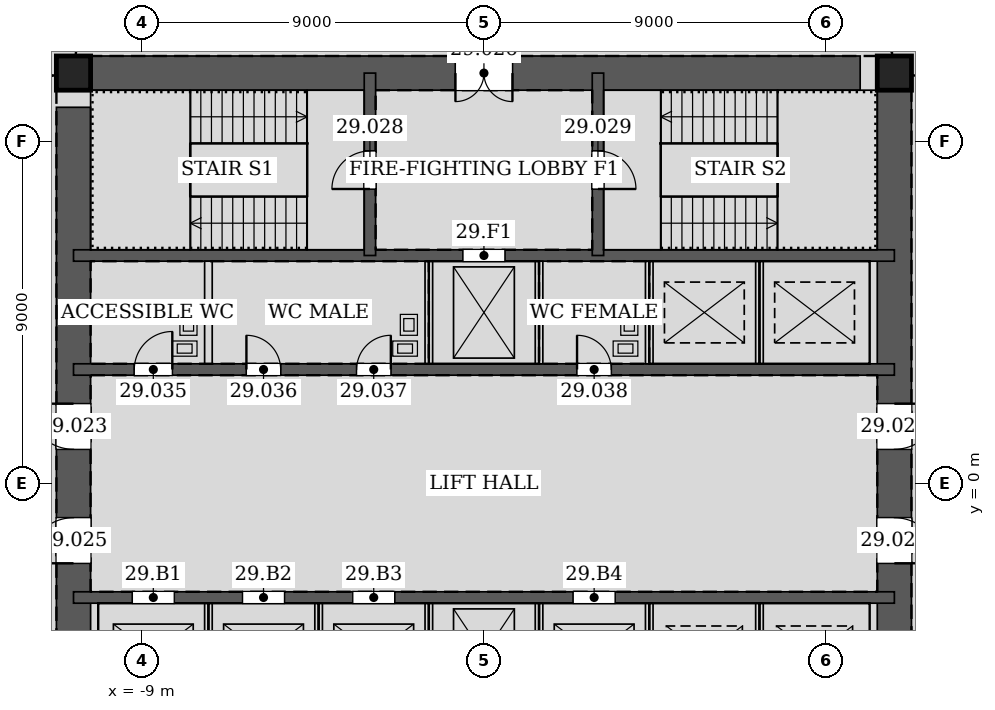
"""IFC4 building model, lengths in metres.
Left out: names, types, materials, properties, quantities, classifications, styles, units other than length and angle.
Written with IfcOpenShell. Run it as: python <this file> out.ifc"""

import sys

from ifc_helpers import new_model, si_unit, direction, frame, frame_2d, origin, origin_2d, place, context, subcontext, project, spatial, rectangle, hollow_rectangle, extrude, element, fill, save


model = new_model("IFC4")
c1 = context("Model", 3, precision=1e-05, world=origin(), true_north=direction((0.0, 1.0)))
c2 = subcontext(c1, "Body", "Model", "MODEL_VIEW")
j1 = project(units=[si_unit("LENGTHUNIT", "METRE"), si_unit("PLANEANGLEUNIT", "RADIAN")], contexts=[c1])
p1 = place(None, origin())
s1 = spatial("IfcSite", under=j1, at=p1, CompositionType="ELEMENT")
p2 = place(p1, origin())
s2 = spatial("IfcBuilding", under=s1, at=p2, CompositionType="ELEMENT")
p3 = place(p2, frame((0.0, 0.0, 130.2)))
s3 = spatial("IfcBuildingStorey", under=s2, at=p3, CompositionType="ELEMENT", Elevation=130.2)
for number, where, z_axis, x_axis in (
    (1, (10.8, 10.8, 0.0), (0.0, 0.0, 1.0), (1.0, 0.0, 0.0)),
    (2, (-10.8, 10.8, 0.0), (0.0, 0.0, 1.0), (1.0, 0.0, 0.0)),
):
    element("IfcColumn", number, at=place(p3, frame(where, z_axis=z_axis, x_axis=x_axis)), inside=s3, PredefinedType="COLUMN", context=c2, shape_type="SweptSolid", body=[
        extrude(hollow_rectangle(XDim=0.9, YDim=0.9, WallThickness=0.06, at=origin_2d()), origin(), (0.0, 0.0, 1.0), 4.2),
    ])
p4 = place(p3, frame((10.8, -10.8, 0.0), z_axis=(0.0, 0.0, 1.0), x_axis=(0.0, 1.0, 0.0)))
e3 = element("IfcWall", 3, at=p4, inside=s3, PredefinedType="SOLIDWALL", context=c2, shape_type="SweptSolid", body=[
    extrude(rectangle(XDim=21.6, YDim=0.9, at=frame_2d((10.8, 0.0))), origin(), (0.0, 0.0, 1.0), 4.2),
])
p5 = place(p4, frame((11.7, 0.0, 0.0)))
e4 = element("IfcOpeningElement", 4, at=p5, cuts=e3, PredefinedType="OPENING", context=c2, shape_type="SweptSolid", body=[
    extrude(rectangle(XDim=1.2, YDim=2.1, at=frame_2d((0.6, 1.05))), frame((0.0, 0.46, 0.0), z_axis=(0.0, -1.0, 0.0), x_axis=(1.0, 0.0, 0.0)), (0.0, 0.0, 1.0), 0.92),
])
p6 = place(p4, frame((8.7, 0.0, 0.0)))
e5 = element("IfcOpeningElement", 5, at=p6, cuts=e3, PredefinedType="OPENING", context=c2, shape_type="SweptSolid", body=[
    extrude(rectangle(XDim=1.2, YDim=2.1, at=frame_2d((0.6, 1.05))), frame((0.0, 0.46, 0.0), z_axis=(0.0, -1.0, 0.0), x_axis=(1.0, 0.0, 0.0)), (0.0, 0.0, 1.0), 0.92),
])
p7 = place(p3, frame((10.8, 10.8, 0.0), z_axis=(0.0, 0.0, 1.0), x_axis=(-1.0, 0.0, 0.0)))
e6 = element("IfcWall", 6, at=p7, inside=s3, PredefinedType="SOLIDWALL", context=c2, shape_type="SweptSolid", body=[
    extrude(rectangle(XDim=21.6, YDim=0.9, at=frame_2d((10.8, 0.0))), origin(), (0.0, 0.0, 1.0), 4.2),
])
p8 = place(p7, frame((10.05, 0.0, 0.0)))
e7 = element("IfcOpeningElement", 7, at=p8, cuts=e6, PredefinedType="OPENING", context=c2, shape_type="SweptSolid", body=[
    extrude(rectangle(XDim=1.5, YDim=2.1, at=frame_2d((0.75, 1.05))), frame((0.0, 0.46, 0.0), z_axis=(0.0, -1.0, 0.0), x_axis=(1.0, 0.0, 0.0)), (0.0, 0.0, 1.0), 0.92),
])
p9 = place(p3, frame((-10.8, 10.8, 0.0), z_axis=(0.0, 0.0, 1.0), x_axis=(0.0, -1.0, 0.0)))
e8 = element("IfcWall", 8, at=p9, inside=s3, PredefinedType="SOLIDWALL", context=c2, shape_type="SweptSolid", body=[
    extrude(rectangle(XDim=21.6, YDim=0.9, at=frame_2d((10.8, 0.0))), origin(), (0.0, 0.0, 1.0), 4.2),
])
p10 = place(p9, frame((8.7, 0.0, 0.0)))
e9 = element("IfcOpeningElement", 9, at=p10, cuts=e8, PredefinedType="OPENING", context=c2, shape_type="SweptSolid", body=[
    extrude(rectangle(XDim=1.2, YDim=2.1, at=frame_2d((0.6, 1.05))), frame((0.0, 0.46, 0.0), z_axis=(0.0, -1.0, 0.0), x_axis=(1.0, 0.0, 0.0)), (0.0, 0.0, 1.0), 0.92),
])
p11 = place(p9, frame((11.7, 0.0, 0.0)))
e10 = element("IfcOpeningElement", 10, at=p11, cuts=e8, PredefinedType="OPENING", context=c2, shape_type="SweptSolid", body=[
    extrude(rectangle(XDim=1.2, YDim=2.1, at=frame_2d((0.6, 1.05))), frame((0.0, 0.46, 0.0), z_axis=(0.0, -1.0, 0.0), x_axis=(1.0, 0.0, 0.0)), (0.0, 0.0, 1.0), 0.92),
])
p12 = place(p3, frame((-10.8, 3.0, 0.0), z_axis=(0.0, 0.0, 1.0), x_axis=(1.0, 0.0, 0.0)))
e11 = element("IfcWall", 11, at=p12, inside=s3, PredefinedType="SOLIDWALL", context=c2, shape_type="SweptSolid", body=[
    extrude(rectangle(XDim=21.6, YDim=0.3, at=frame_2d((10.8, 0.0))), origin(), (0.0, 0.0, 1.0), 4.2),
])
p13 = place(p12, frame((1.6, 0.0, 0.0)))
e12 = element("IfcOpeningElement", 12, at=p13, cuts=e11, PredefinedType="OPENING", context=c2, shape_type="SweptSolid", body=[
    extrude(rectangle(XDim=1.0, YDim=2.1, at=frame_2d((0.5, 1.05))), frame((0.0, 0.16, 0.0), z_axis=(0.0, -1.0, 0.0), x_axis=(1.0, 0.0, 0.0)), (0.0, 0.0, 1.0), 0.32),
])
p14 = place(p12, frame((4.55, 0.0, 0.0)))
e13 = element("IfcOpeningElement", 13, at=p14, cuts=e11, PredefinedType="OPENING", context=c2, shape_type="SweptSolid", body=[
    extrude(rectangle(XDim=0.9, YDim=2.1, at=frame_2d((0.45, 1.05))), frame((0.0, 0.16, 0.0), z_axis=(0.0, -1.0, 0.0), x_axis=(1.0, 0.0, 0.0)), (0.0, 0.0, 1.0), 0.32),
])
p15 = place(p12, frame((7.45, 0.0, 0.0)))
e14 = element("IfcOpeningElement", 14, at=p15, cuts=e11, PredefinedType="OPENING", context=c2, shape_type="SweptSolid", body=[
    extrude(rectangle(XDim=0.9, YDim=2.1, at=frame_2d((0.45, 1.05))), frame((0.0, 0.16, 0.0), z_axis=(0.0, -1.0, 0.0), x_axis=(1.0, 0.0, 0.0)), (0.0, 0.0, 1.0), 0.32),
])
p16 = place(p12, frame((13.25, 0.0, 0.0)))
e15 = element("IfcOpeningElement", 15, at=p16, cuts=e11, PredefinedType="OPENING", context=c2, shape_type="SweptSolid", body=[
    extrude(rectangle(XDim=0.9, YDim=2.1, at=frame_2d((0.45, 1.05))), frame((0.0, 0.16, 0.0), z_axis=(0.0, -1.0, 0.0), x_axis=(1.0, 0.0, 0.0)), (0.0, 0.0, 1.0), 0.32),
])
p17 = place(p3, frame((-10.8, 6.0, 0.0), z_axis=(0.0, 0.0, 1.0), x_axis=(1.0, 0.0, 0.0)))
e16 = element("IfcWall", 16, at=p17, inside=s3, PredefinedType="SOLIDWALL", context=c2, shape_type="SweptSolid", body=[
    extrude(rectangle(XDim=21.6, YDim=0.3, at=frame_2d((10.8, 0.0))), origin(), (0.0, 0.0, 1.0), 4.2),
])
p18 = place(p17, frame((10.25, 0.0, 0.0)))
e17 = element("IfcOpeningElement", 17, at=p18, cuts=e16, PredefinedType="OPENING", context=c2, shape_type="SweptSolid", body=[
    extrude(rectangle(XDim=1.1, YDim=2.1, at=frame_2d((0.55, 1.05))), frame((0.0, 0.16, 0.0), z_axis=(0.0, -1.0, 0.0), x_axis=(1.0, 0.0, 0.0)), (0.0, 0.0, 1.0), 0.32),
])
p19 = place(p3, frame((-3.0, 6.0, 0.0), z_axis=(0.0, 0.0, 1.0), x_axis=(0.0, 1.0, 0.0)))
e18 = element("IfcWall", 18, at=p19, inside=s3, PredefinedType="SOLIDWALL", context=c2, shape_type="SweptSolid", body=[
    extrude(rectangle(XDim=4.8, YDim=0.3, at=frame_2d((2.4, 0.0))), origin(), (0.0, 0.0, 1.0), 4.2),
])
p20 = place(p19, frame((1.75, 0.0, 0.0)))
e19 = element("IfcOpeningElement", 19, at=p20, cuts=e18, PredefinedType="OPENING", context=c2, shape_type="SweptSolid", body=[
    extrude(rectangle(XDim=1.0, YDim=2.1, at=frame_2d((0.5, 1.05))), frame((0.0, 0.16, 0.0), z_axis=(0.0, -1.0, 0.0), x_axis=(1.0, 0.0, 0.0)), (0.0, 0.0, 1.0), 0.32),
])
p21 = place(p3, frame((3.0, 6.0, 0.0), z_axis=(0.0, 0.0, 1.0), x_axis=(0.0, 1.0, 0.0)))
e20 = element("IfcWall", 20, at=p21, inside=s3, PredefinedType="SOLIDWALL", context=c2, shape_type="SweptSolid", body=[
    extrude(rectangle(XDim=4.8, YDim=0.3, at=frame_2d((2.4, 0.0))), origin(), (0.0, 0.0, 1.0), 4.2),
])
p22 = place(p21, frame((1.75, 0.0, 0.0)))
e21 = element("IfcOpeningElement", 21, at=p22, cuts=e20, PredefinedType="OPENING", context=c2, shape_type="SweptSolid", body=[
    extrude(rectangle(XDim=1.0, YDim=2.1, at=frame_2d((0.5, 1.05))), frame((0.0, 0.16, 0.0), z_axis=(0.0, -1.0, 0.0), x_axis=(1.0, 0.0, 0.0)), (0.0, 0.0, 1.0), 0.32),
])
p23 = place(p3, frame((-10.8, -3.0, 0.0), z_axis=(0.0, 0.0, 1.0), x_axis=(1.0, 0.0, 0.0)))
e22 = element("IfcWall", 22, at=p23, inside=s3, PredefinedType="SOLIDWALL", context=c2, shape_type="SweptSolid", body=[
    extrude(rectangle(XDim=21.6, YDim=0.3, at=frame_2d((10.8, 0.0))), origin(), (0.0, 0.0, 1.0), 4.2),
])
p24 = place(p23, frame((1.55, 0.0, 0.0)))
e23 = element("IfcOpeningElement", 23, at=p24, cuts=e22, PredefinedType="OPENING", context=c2, shape_type="SweptSolid", body=[
    extrude(rectangle(XDim=1.1, YDim=2.1, at=frame_2d((0.55, 1.05))), frame((0.0, 0.16, 0.0), z_axis=(0.0, -1.0, 0.0), x_axis=(1.0, 0.0, 0.0)), (0.0, 0.0, 1.0), 0.32),
])
p25 = place(p23, frame((4.45, 0.0, 0.0)))
e24 = element("IfcOpeningElement", 24, at=p25, cuts=e22, PredefinedType="OPENING", context=c2, shape_type="SweptSolid", body=[
    extrude(rectangle(XDim=1.1, YDim=2.1, at=frame_2d((0.55, 1.05))), frame((0.0, 0.16, 0.0), z_axis=(0.0, -1.0, 0.0), x_axis=(1.0, 0.0, 0.0)), (0.0, 0.0, 1.0), 0.32),
])
p26 = place(p23, frame((7.35, 0.0, 0.0)))
e25 = element("IfcOpeningElement", 25, at=p26, cuts=e22, PredefinedType="OPENING", context=c2, shape_type="SweptSolid", body=[
    extrude(rectangle(XDim=1.1, YDim=2.1, at=frame_2d((0.55, 1.05))), frame((0.0, 0.16, 0.0), z_axis=(0.0, -1.0, 0.0), x_axis=(1.0, 0.0, 0.0)), (0.0, 0.0, 1.0), 0.32),
])
p27 = place(p23, frame((13.15, 0.0, 0.0)))
e26 = element("IfcOpeningElement", 26, at=p27, cuts=e22, PredefinedType="OPENING", context=c2, shape_type="SweptSolid", body=[
    extrude(rectangle(XDim=1.1, YDim=2.1, at=frame_2d((0.55, 1.05))), frame((0.0, 0.16, 0.0), z_axis=(0.0, -1.0, 0.0), x_axis=(1.0, 0.0, 0.0)), (0.0, 0.0, 1.0), 0.32),
])
for number, where, z_axis, x_axis in (
    (27, (-7.25, 3.15, 0.0), (0.0, 0.0, 1.0), (0.0, 1.0, 0.0)),
    (28, (-1.45, 3.15, 0.0), (0.0, 0.0, 1.0), (0.0, 1.0, 0.0)),
    (29, (1.45, 3.15, 0.0), (0.0, 0.0, 1.0), (0.0, 1.0, 0.0)),
    (30, (4.35, 3.15, 0.0), (0.0, 0.0, 1.0), (0.0, 1.0, 0.0)),
):
    element("IfcWall", number, at=place(p3, frame(where, z_axis=z_axis, x_axis=x_axis)), inside=s3, PredefinedType="PARTITIONING", context=c2, shape_type="SweptSolid", body=[
        extrude(rectangle(XDim=2.7, YDim=0.2, at=frame_2d((1.35, 0.0))), origin(), (0.0, 0.0, 1.0), 4.035),
    ])
for number, where, z_axis, x_axis in (
    (31, (7.25, 3.15, 0.0), (0.0, 0.0, 1.0), (0.0, 1.0, 0.0)),
    (32, (-7.25, -5.85, 0.0), (0.0, 0.0, 1.0), (0.0, 1.0, 0.0)),
    (33, (-4.35, -5.85, 0.0), (0.0, 0.0, 1.0), (0.0, 1.0, 0.0)),
    (34, (-1.45, -5.85, 0.0), (0.0, 0.0, 1.0), (0.0, 1.0, 0.0)),
    (35, (1.45, -5.85, 0.0), (0.0, 0.0, 1.0), (0.0, 1.0, 0.0)),
    (36, (4.35, -5.85, 0.0), (0.0, 0.0, 1.0), (0.0, 1.0, 0.0)),
    (37, (7.25, -5.85, 0.0), (0.0, 0.0, 1.0), (0.0, 1.0, 0.0)),
):
    element("IfcWall", number, at=place(p3, frame(where, z_axis=z_axis, x_axis=x_axis)), inside=s3, PredefinedType="PARTITIONING", context=c2, shape_type="SweptSolid", body=[
        extrude(rectangle(XDim=2.7, YDim=0.2, at=frame_2d((1.35, 0.0))), origin(), (0.0, 0.0, 1.0), 4.2),
    ])
p28 = place(p5, frame((1.2, 0.0, 0.0), z_axis=(0.0, 0.0, 1.0), x_axis=(-1.0, 0.0, 0.0)))
e38 = element("IfcDoor", 38, at=p28, inside=s3, OperationType="SINGLE_SWING_LEFT", PredefinedType="DOOR", context=c2, shape_type="SweptSolid", body=[
    extrude(rectangle(XDim=1.2, YDim=2.1, at=frame_2d((0.6, 1.05))), frame((0.0, 0.025, 0.0), z_axis=(0.0, -1.0, 0.0), x_axis=(1.0, 0.0, 0.0)), (0.0, 0.0, 1.0), 0.05),
])
fill(e4, e38)
p29 = place(p10, frame((1.2, 0.0, 0.0), z_axis=(0.0, 0.0, 1.0), x_axis=(-1.0, 0.0, 0.0)))
e39 = element("IfcDoor", 39, at=p29, inside=s3, OperationType="SINGLE_SWING_RIGHT", PredefinedType="DOOR", context=c2, shape_type="SweptSolid", body=[
    extrude(rectangle(XDim=1.2, YDim=2.1, at=frame_2d((0.6, 1.05))), frame((0.0, 0.025, 0.0), z_axis=(0.0, -1.0, 0.0), x_axis=(1.0, 0.0, 0.0)), (0.0, 0.0, 1.0), 0.05),
])
fill(e9, e39)
p30 = place(p6, frame((1.2, 0.0, 0.0), z_axis=(0.0, 0.0, 1.0), x_axis=(-1.0, 0.0, 0.0)))
e40 = element("IfcDoor", 40, at=p30, inside=s3, OperationType="SINGLE_SWING_RIGHT", PredefinedType="DOOR", context=c2, shape_type="SweptSolid", body=[
    extrude(rectangle(XDim=1.2, YDim=2.1, at=frame_2d((0.6, 1.05))), frame((0.0, 0.025, 0.0), z_axis=(0.0, -1.0, 0.0), x_axis=(1.0, 0.0, 0.0)), (0.0, 0.0, 1.0), 0.05),
])
fill(e5, e40)
p31 = place(p11, frame((1.2, 0.0, 0.0), z_axis=(0.0, 0.0, 1.0), x_axis=(-1.0, 0.0, 0.0)))
e41 = element("IfcDoor", 41, at=p31, inside=s3, OperationType="SINGLE_SWING_LEFT", PredefinedType="DOOR", context=c2, shape_type="SweptSolid", body=[
    extrude(rectangle(XDim=1.2, YDim=2.1, at=frame_2d((0.6, 1.05))), frame((0.0, 0.025, 0.0), z_axis=(0.0, -1.0, 0.0), x_axis=(1.0, 0.0, 0.0)), (0.0, 0.0, 1.0), 0.05),
])
fill(e10, e41)
p32 = place(p8, origin())
e42 = element("IfcDoor", 42, at=p32, inside=s3, OperationType="DOUBLE_DOOR_SINGLE_SWING", PredefinedType="DOOR", context=c2, shape_type="SweptSolid", body=[
    extrude(rectangle(XDim=1.5, YDim=2.1, at=frame_2d((0.75, 1.05))), frame((0.0, 0.025, 0.0), z_axis=(0.0, -1.0, 0.0), x_axis=(1.0, 0.0, 0.0)), (0.0, 0.0, 1.0), 0.05),
])
fill(e7, e42)
p33 = place(p20, origin())
e43 = element("IfcDoor", 43, at=p33, inside=s3, OperationType="SINGLE_SWING_LEFT", PredefinedType="DOOR", context=c2, shape_type="SweptSolid", body=[
    extrude(rectangle(XDim=1.0, YDim=2.1, at=frame_2d((0.5, 1.05))), frame((0.0, 0.025, 0.0), z_axis=(0.0, -1.0, 0.0), x_axis=(1.0, 0.0, 0.0)), (0.0, 0.0, 1.0), 0.05),
])
fill(e19, e43)
p34 = place(p22, frame((1.0, 0.0, 0.0), z_axis=(0.0, 0.0, 1.0), x_axis=(-1.0, 0.0, 0.0)))
e44 = element("IfcDoor", 44, at=p34, inside=s3, OperationType="SINGLE_SWING_RIGHT", PredefinedType="DOOR", context=c2, shape_type="SweptSolid", body=[
    extrude(rectangle(XDim=1.0, YDim=2.1, at=frame_2d((0.5, 1.05))), frame((0.0, 0.025, 0.0), z_axis=(0.0, -1.0, 0.0), x_axis=(1.0, 0.0, 0.0)), (0.0, 0.0, 1.0), 0.05),
])
fill(e21, e44)
p35 = place(p13, origin())
e45 = element("IfcDoor", 45, at=p35, inside=s3, OperationType="SINGLE_SWING_RIGHT", PredefinedType="DOOR", context=c2, shape_type="SweptSolid", body=[
    extrude(rectangle(XDim=1.0, YDim=2.1, at=frame_2d((0.5, 1.05))), frame((0.0, 0.025, 0.0), z_axis=(0.0, -1.0, 0.0), x_axis=(1.0, 0.0, 0.0)), (0.0, 0.0, 1.0), 0.05),
])
fill(e12, e45)
p36 = place(p14, origin())
e46 = element("IfcDoor", 46, at=p36, inside=s3, OperationType="SINGLE_SWING_LEFT", PredefinedType="DOOR", context=c2, shape_type="SweptSolid", body=[
    extrude(rectangle(XDim=0.9, YDim=2.1, at=frame_2d((0.45, 1.05))), frame((0.0, 0.025, 0.0), z_axis=(0.0, -1.0, 0.0), x_axis=(1.0, 0.0, 0.0)), (0.0, 0.0, 1.0), 0.05),
])
fill(e13, e46)
p37 = place(p15, origin())
e47 = element("IfcDoor", 47, at=p37, inside=s3, OperationType="SINGLE_SWING_RIGHT", PredefinedType="DOOR", context=c2, shape_type="SweptSolid", body=[
    extrude(rectangle(XDim=0.9, YDim=2.1, at=frame_2d((0.45, 1.05))), frame((0.0, 0.025, 0.0), z_axis=(0.0, -1.0, 0.0), x_axis=(1.0, 0.0, 0.0)), (0.0, 0.0, 1.0), 0.05),
])
fill(e14, e47)
p38 = place(p16, origin())
e48 = element("IfcDoor", 48, at=p38, inside=s3, OperationType="SINGLE_SWING_LEFT", PredefinedType="DOOR", context=c2, shape_type="SweptSolid", body=[
    extrude(rectangle(XDim=0.9, YDim=2.1, at=frame_2d((0.45, 1.05))), frame((0.0, 0.025, 0.0), z_axis=(0.0, -1.0, 0.0), x_axis=(1.0, 0.0, 0.0)), (0.0, 0.0, 1.0), 0.05),
])
fill(e15, e48)
p39 = place(p18, origin())
e49 = element("IfcDoor", 49, at=p39, inside=s3, OperationType="DOUBLE_DOOR_SLIDING", PredefinedType="DOOR", context=c2, shape_type="SweptSolid", body=[
    extrude(rectangle(XDim=1.1, YDim=2.1, at=frame_2d((0.55, 1.05))), frame((0.0, 0.025, 0.0), z_axis=(0.0, -1.0, 0.0), x_axis=(1.0, 0.0, 0.0)), (0.0, 0.0, 1.0), 0.05),
])
fill(e17, e49)
p40 = place(p24, origin())
e50 = element("IfcDoor", 50, at=p40, inside=s3, OperationType="DOUBLE_DOOR_SLIDING", PredefinedType="DOOR", context=c2, shape_type="SweptSolid", body=[
    extrude(rectangle(XDim=1.1, YDim=2.1, at=frame_2d((0.55, 1.05))), frame((0.0, 0.025, 0.0), z_axis=(0.0, -1.0, 0.0), x_axis=(1.0, 0.0, 0.0)), (0.0, 0.0, 1.0), 0.05),
])
fill(e23, e50)
p41 = place(p25, origin())
e51 = element("IfcDoor", 51, at=p41, inside=s3, OperationType="DOUBLE_DOOR_SLIDING", PredefinedType="DOOR", context=c2, shape_type="SweptSolid", body=[
    extrude(rectangle(XDim=1.1, YDim=2.1, at=frame_2d((0.55, 1.05))), frame((0.0, 0.025, 0.0), z_axis=(0.0, -1.0, 0.0), x_axis=(1.0, 0.0, 0.0)), (0.0, 0.0, 1.0), 0.05),
])
fill(e24, e51)
p42 = place(p26, origin())
e52 = element("IfcDoor", 52, at=p42, inside=s3, OperationType="DOUBLE_DOOR_SLIDING", PredefinedType="DOOR", context=c2, shape_type="SweptSolid", body=[
    extrude(rectangle(XDim=1.1, YDim=2.1, at=frame_2d((0.55, 1.05))), frame((0.0, 0.025, 0.0), z_axis=(0.0, -1.0, 0.0), x_axis=(1.0, 0.0, 0.0)), (0.0, 0.0, 1.0), 0.05),
])
fill(e25, e52)
p43 = place(p27, origin())
e53 = element("IfcDoor", 53, at=p43, inside=s3, OperationType="DOUBLE_DOOR_SLIDING", PredefinedType="DOOR", context=c2, shape_type="SweptSolid", body=[
    extrude(rectangle(XDim=1.1, YDim=2.1, at=frame_2d((0.55, 1.05))), frame((0.0, 0.025, 0.0), z_axis=(0.0, -1.0, 0.0), x_axis=(1.0, 0.0, 0.0)), (0.0, 0.0, 1.0), 0.05),
])
fill(e26, e53)
save(model, sys.argv[1])
